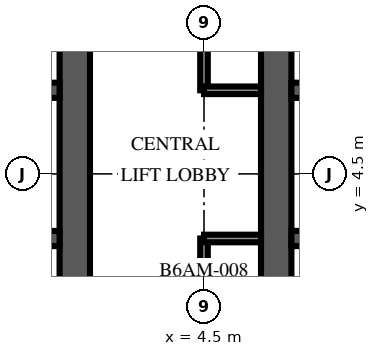
"""IFC4 building model, lengths in metres.
Left out: names, types, materials, properties, quantities, classifications, styles, units other than length and angle.
Written with IfcOpenShell. Run it as: python <this file> out.ifc"""

import sys

from ifc_helpers import new_model, si_unit, direction, frame, frame_2d, origin, place, context, subcontext, project, spatial, rectangle, extrude, element, fill, save


model = new_model("IFC4")
c1 = context("Model", 3, precision=1e-05, world=origin(), true_north=direction((0.0, 1.0)))
c2 = subcontext(c1, "Body", "Model", "MODEL_VIEW")
j1 = project(units=[si_unit("LENGTHUNIT", "METRE"), si_unit("PLANEANGLEUNIT", "RADIAN")], contexts=[c1])
p1 = place(None, origin())
s1 = spatial("IfcSite", under=j1, at=p1, CompositionType="ELEMENT")
p2 = place(p1, origin())
s2 = spatial("IfcBuilding", under=s1, at=p2, CompositionType="ELEMENT")
p3 = place(p2, frame((0.0, 0.0, 220.2)))
s3 = spatial("IfcBuildingStorey", under=s2, at=p3, CompositionType="ELEMENT", Elevation=220.2)
p4 = place(p3, frame((1.1, -9.0, 0.0), z_axis=(0.0, 0.0, 1.0), x_axis=(0.0, 1.0, 0.0)))
e1 = element("IfcWall", 1, at=p4, inside=s3, PredefinedType="SHEAR", context=c2, shape_type="SweptSolid", body=[
    extrude(rectangle(XDim=27.5, YDim=0.8, at=frame_2d((13.75, 0.0))), origin(), (0.0, 0.0, 1.0), 6.0),
])
p5 = place(p4, frame((12.55, 0.0, 0.0)))
e2 = element("IfcOpeningElement", 2, at=p5, cuts=e1, PredefinedType="OPENING", context=c2, shape_type="SweptSolid", body=[
    extrude(rectangle(XDim=2.4, YDim=2.4, at=frame_2d((1.2, 1.2))), frame((0.0, 0.41, 0.0), z_axis=(0.0, -1.0, 0.0), x_axis=(1.0, 0.0, 0.0)), (0.0, 0.0, 1.0), 0.82),
])
p6 = place(p4, frame((5.5, 0.0, 0.0)))
e3 = element("IfcOpeningElement", 3, at=p6, cuts=e1, PredefinedType="OPENING", context=c2, shape_type="SweptSolid", body=[
    extrude(rectangle(XDim=0.95, YDim=2.1, at=frame_2d((0.475, 1.05))), frame((0.0, 0.41, 0.0), z_axis=(0.0, -1.0, 0.0), x_axis=(1.0, 0.0, 0.0)), (0.0, 0.0, 1.0), 0.82),
])
p7 = place(p4, frame((23.475, 0.0, 0.0)))
e4 = element("IfcOpeningElement", 4, at=p7, cuts=e1, PredefinedType="OPENING", context=c2, shape_type="SweptSolid", body=[
    extrude(rectangle(XDim=1.2, YDim=2.1, at=frame_2d((0.6, 1.05))), frame((0.0, 0.41, 0.0), z_axis=(0.0, -1.0, 0.0), x_axis=(1.0, 0.0, 0.0)), (0.0, 0.0, 1.0), 0.82),
])
p8 = place(p3, frame((-9.7, 2.8, 0.0), z_axis=(0.0, 0.0, 1.0), x_axis=(1.0, 0.0, 0.0)))
e5 = element("IfcWall", 5, at=p8, inside=s3, PredefinedType="SHEAR", context=c2, shape_type="SweptSolid", body=[
    extrude(rectangle(XDim=10.4, YDim=0.4, at=frame_2d((5.2, 0.0))), origin(), (0.0, 0.0, 1.0), 6.0),
])
p9 = place(p8, frame((0.738, 0.0, 0.0)))
e6 = element("IfcOpeningElement", 6, at=p9, cuts=e5, PredefinedType="OPENING", context=c2, shape_type="SweptSolid", body=[
    extrude(rectangle(XDim=1.1, YDim=2.1, at=frame_2d((0.55, 1.05))), frame((0.0, 0.21, 0.0), z_axis=(0.0, -1.0, 0.0), x_axis=(1.0, 0.0, 0.0)), (0.0, 0.0, 1.0), 0.42),
])
p10 = place(p8, frame((3.337, 0.0, 0.0)))
e7 = element("IfcOpeningElement", 7, at=p10, cuts=e5, PredefinedType="OPENING", context=c2, shape_type="SweptSolid", body=[
    extrude(rectangle(XDim=1.1, YDim=2.1, at=frame_2d((0.55, 1.05))), frame((0.0, 0.21, 0.0), z_axis=(0.0, -1.0, 0.0), x_axis=(1.0, 0.0, 0.0)), (0.0, 0.0, 1.0), 0.42),
])
p11 = place(p8, frame((6.012, 0.0, 0.0)))
e8 = element("IfcOpeningElement", 8, at=p11, cuts=e5, PredefinedType="OPENING", context=c2, shape_type="SweptSolid", body=[
    extrude(rectangle(XDim=1.0, YDim=2.1, at=frame_2d((0.5, 1.05))), frame((0.0, 0.21, 0.0), z_axis=(0.0, -1.0, 0.0), x_axis=(1.0, 0.0, 0.0)), (0.0, 0.0, 1.0), 0.42),
])
p12 = place(p8, frame((8.613, 0.0, 0.0)))
e9 = element("IfcOpeningElement", 9, at=p12, cuts=e5, PredefinedType="OPENING", context=c2, shape_type="SweptSolid", body=[
    extrude(rectangle(XDim=1.0, YDim=2.1, at=frame_2d((0.5, 1.05))), frame((0.0, 0.21, 0.0), z_axis=(0.0, -1.0, 0.0), x_axis=(1.0, 0.0, 0.0)), (0.0, 0.0, 1.0), 0.42),
])
p13 = place(p3, frame((-9.7, 6.7, 0.0), z_axis=(0.0, 0.0, 1.0), x_axis=(1.0, 0.0, 0.0)))
e10 = element("IfcWall", 10, at=p13, inside=s3, PredefinedType="SHEAR", context=c2, shape_type="SweptSolid", body=[
    extrude(rectangle(XDim=10.4, YDim=0.4, at=frame_2d((5.2, 0.0))), origin(), (0.0, 0.0, 1.0), 6.0),
])
p14 = place(p13, frame((3.337, 0.0, 0.0)))
e11 = element("IfcOpeningElement", 11, at=p14, cuts=e10, PredefinedType="OPENING", context=c2, shape_type="SweptSolid", body=[
    extrude(rectangle(XDim=1.1, YDim=2.1, at=frame_2d((0.55, 1.05))), frame((0.0, 0.21, 0.0), z_axis=(0.0, -1.0, 0.0), x_axis=(1.0, 0.0, 0.0)), (0.0, 0.0, 1.0), 0.42),
])
p15 = place(p13, frame((5.962, 0.0, 0.0)))
e12 = element("IfcOpeningElement", 12, at=p15, cuts=e10, PredefinedType="OPENING", context=c2, shape_type="SweptSolid", body=[
    extrude(rectangle(XDim=1.1, YDim=2.1, at=frame_2d((0.55, 1.05))), frame((0.0, 0.21, 0.0), z_axis=(0.0, -1.0, 0.0), x_axis=(1.0, 0.0, 0.0)), (0.0, 0.0, 1.0), 0.42),
])
p16 = place(p13, frame((8.663, 0.0, 0.0)))
e13 = element("IfcOpeningElement", 13, at=p16, cuts=e10, PredefinedType="OPENING", context=c2, shape_type="SweptSolid", body=[
    extrude(rectangle(XDim=1.1, YDim=2.1, at=frame_2d((0.55, 1.05))), frame((0.0, 0.21, 0.0), z_axis=(0.0, -1.0, 0.0), x_axis=(1.0, 0.0, 0.0)), (0.0, 0.0, 1.0), 0.42),
])
p17 = place(p13, frame((0.688, 0.0, 0.0)))
e14 = element("IfcOpeningElement", 14, at=p17, cuts=e10, PredefinedType="OPENING", context=c2, shape_type="SweptSolid", body=[
    extrude(rectangle(XDim=1.0, YDim=2.1, at=frame_2d((0.5, 1.05))), frame((0.0, 0.21, 0.0), z_axis=(0.0, -1.0, 0.0), x_axis=(1.0, 0.0, 0.0)), (0.0, 0.0, 1.0), 0.42),
])
p18 = place(p3, frame((6.4, -9.0, 0.0), z_axis=(0.0, 0.0, 1.0), x_axis=(0.0, 1.0, 0.0)))
e15 = element("IfcWall", 15, at=p18, inside=s3, PredefinedType="SHEAR", context=c2, shape_type="SweptSolid", body=[
    extrude(rectangle(XDim=27.5, YDim=0.8, at=frame_2d((13.75, 0.0))), origin(), (0.0, 0.0, 1.0), 6.0),
])
p19 = place(p18, frame((12.55, 0.0, 0.0)))
e16 = element("IfcOpeningElement", 16, at=p19, cuts=e15, PredefinedType="OPENING", context=c2, shape_type="SweptSolid", body=[
    extrude(rectangle(XDim=2.4, YDim=2.4, at=frame_2d((1.2, 1.2))), frame((0.0, 0.41, 0.0), z_axis=(0.0, -1.0, 0.0), x_axis=(1.0, 0.0, 0.0)), (0.0, 0.0, 1.0), 0.82),
])
p20 = place(p18, frame((5.5, 0.0, 0.0)))
e17 = element("IfcOpeningElement", 17, at=p20, cuts=e15, PredefinedType="OPENING", context=c2, shape_type="SweptSolid", body=[
    extrude(rectangle(XDim=0.95, YDim=2.1, at=frame_2d((0.475, 1.05))), frame((0.0, 0.41, 0.0), z_axis=(0.0, -1.0, 0.0), x_axis=(1.0, 0.0, 0.0)), (0.0, 0.0, 1.0), 0.82),
])
p21 = place(p18, frame((23.475, 0.0, 0.0)))
e18 = element("IfcOpeningElement", 18, at=p21, cuts=e15, PredefinedType="OPENING", context=c2, shape_type="SweptSolid", body=[
    extrude(rectangle(XDim=1.2, YDim=2.1, at=frame_2d((0.6, 1.05))), frame((0.0, 0.41, 0.0), z_axis=(0.0, -1.0, 0.0), x_axis=(1.0, 0.0, 0.0)), (0.0, 0.0, 1.0), 0.82),
])
p22 = place(p3, frame((6.8, 2.8, 0.0), z_axis=(0.0, 0.0, 1.0), x_axis=(1.0, 0.0, 0.0)))
e19 = element("IfcWall", 19, at=p22, inside=s3, PredefinedType="SHEAR", context=c2, shape_type="SweptSolid", body=[
    extrude(rectangle(XDim=10.4, YDim=0.4, at=frame_2d((5.2, 0.0))), origin(), (0.0, 0.0, 1.0), 6.0),
])
p23 = place(p22, frame((0.738, 0.0, 0.0)))
e20 = element("IfcOpeningElement", 20, at=p23, cuts=e19, PredefinedType="OPENING", context=c2, shape_type="SweptSolid", body=[
    extrude(rectangle(XDim=1.1, YDim=2.1, at=frame_2d((0.55, 1.05))), frame((0.0, 0.21, 0.0), z_axis=(0.0, -1.0, 0.0), x_axis=(1.0, 0.0, 0.0)), (0.0, 0.0, 1.0), 0.42),
])
p24 = place(p22, frame((3.337, 0.0, 0.0)))
e21 = element("IfcOpeningElement", 21, at=p24, cuts=e19, PredefinedType="OPENING", context=c2, shape_type="SweptSolid", body=[
    extrude(rectangle(XDim=1.1, YDim=2.1, at=frame_2d((0.55, 1.05))), frame((0.0, 0.21, 0.0), z_axis=(0.0, -1.0, 0.0), x_axis=(1.0, 0.0, 0.0)), (0.0, 0.0, 1.0), 0.42),
])
p25 = place(p22, frame((6.012, 0.0, 0.0)))
e22 = element("IfcOpeningElement", 22, at=p25, cuts=e19, PredefinedType="OPENING", context=c2, shape_type="SweptSolid", body=[
    extrude(rectangle(XDim=1.0, YDim=2.1, at=frame_2d((0.5, 1.05))), frame((0.0, 0.21, 0.0), z_axis=(0.0, -1.0, 0.0), x_axis=(1.0, 0.0, 0.0)), (0.0, 0.0, 1.0), 0.42),
])
p26 = place(p22, frame((8.613, 0.0, 0.0)))
e23 = element("IfcOpeningElement", 23, at=p26, cuts=e19, PredefinedType="OPENING", context=c2, shape_type="SweptSolid", body=[
    extrude(rectangle(XDim=1.0, YDim=2.1, at=frame_2d((0.5, 1.05))), frame((0.0, 0.21, 0.0), z_axis=(0.0, -1.0, 0.0), x_axis=(1.0, 0.0, 0.0)), (0.0, 0.0, 1.0), 0.42),
])
p27 = place(p3, frame((6.8, 6.7, 0.0), z_axis=(0.0, 0.0, 1.0), x_axis=(1.0, 0.0, 0.0)))
e24 = element("IfcWall", 24, at=p27, inside=s3, PredefinedType="SHEAR", context=c2, shape_type="SweptSolid", body=[
    extrude(rectangle(XDim=10.4, YDim=0.4, at=frame_2d((5.2, 0.0))), origin(), (0.0, 0.0, 1.0), 6.0),
])
p28 = place(p27, frame((3.337, 0.0, 0.0)))
e25 = element("IfcOpeningElement", 25, at=p28, cuts=e24, PredefinedType="OPENING", context=c2, shape_type="SweptSolid", body=[
    extrude(rectangle(XDim=1.1, YDim=2.1, at=frame_2d((0.55, 1.05))), frame((0.0, 0.21, 0.0), z_axis=(0.0, -1.0, 0.0), x_axis=(1.0, 0.0, 0.0)), (0.0, 0.0, 1.0), 0.42),
])
p29 = place(p27, frame((5.962, 0.0, 0.0)))
e26 = element("IfcOpeningElement", 26, at=p29, cuts=e24, PredefinedType="OPENING", context=c2, shape_type="SweptSolid", body=[
    extrude(rectangle(XDim=1.1, YDim=2.1, at=frame_2d((0.55, 1.05))), frame((0.0, 0.21, 0.0), z_axis=(0.0, -1.0, 0.0), x_axis=(1.0, 0.0, 0.0)), (0.0, 0.0, 1.0), 0.42),
])
p30 = place(p27, frame((8.663, 0.0, 0.0)))
e27 = element("IfcOpeningElement", 27, at=p30, cuts=e24, PredefinedType="OPENING", context=c2, shape_type="SweptSolid", body=[
    extrude(rectangle(XDim=1.1, YDim=2.1, at=frame_2d((0.55, 1.05))), frame((0.0, 0.21, 0.0), z_axis=(0.0, -1.0, 0.0), x_axis=(1.0, 0.0, 0.0)), (0.0, 0.0, 1.0), 0.42),
])
p31 = place(p27, frame((0.688, 0.0, 0.0)))
e28 = element("IfcOpeningElement", 28, at=p31, cuts=e24, PredefinedType="OPENING", context=c2, shape_type="SweptSolid", body=[
    extrude(rectangle(XDim=1.0, YDim=2.1, at=frame_2d((0.5, 1.05))), frame((0.0, 0.21, 0.0), z_axis=(0.0, -1.0, 0.0), x_axis=(1.0, 0.0, 0.0)), (0.0, 0.0, 1.0), 0.42),
])
p32 = place(p3, frame((4.5, 2.8, 0.0), z_axis=(0.0, 0.0, 1.0), x_axis=(0.0, -1.0, 0.0)))
e29 = element("IfcWall", 29, at=p32, inside=s3, PredefinedType="PARTITIONING", context=c2, shape_type="SweptSolid", body=[
    extrude(rectangle(XDim=4.8, YDim=0.2, at=frame_2d((2.4, 0.0))), origin(), (0.0, 0.0, 1.0), 5.4),
])
p33 = place(p32, frame((1.45, 0.0, 0.0)))
e30 = element("IfcOpeningElement", 30, at=p33, cuts=e29, PredefinedType="OPENING", context=c2, shape_type="SweptSolid", body=[
    extrude(rectangle(XDim=1.0, YDim=2.1, at=frame_2d((0.5, 1.05))), frame((0.0, 0.11, 0.0), z_axis=(0.0, -1.0, 0.0), x_axis=(1.0, 0.0, 0.0)), (0.0, 0.0, 1.0), 0.22),
])
p34 = place(p3, frame((4.5, 18.5, 0.0), z_axis=(0.0, 0.0, 1.0), x_axis=(0.0, -1.0, 0.0)))
e31 = element("IfcWall", 31, at=p34, inside=s3, PredefinedType="PARTITIONING", context=c2, shape_type="SweptSolid", body=[
    extrude(rectangle(XDim=11.8, YDim=0.2, at=frame_2d((5.9, 0.0))), origin(), (0.0, 0.0, 1.0), 5.4),
])
p35 = place(p34, frame((5.95, 0.0, 0.0)))
e32 = element("IfcOpeningElement", 32, at=p35, cuts=e31, PredefinedType="OPENING", context=c2, shape_type="SweptSolid", body=[
    extrude(rectangle(XDim=1.0, YDim=2.1, at=frame_2d((0.5, 1.05))), frame((0.0, 0.11, 0.0), z_axis=(0.0, -1.0, 0.0), x_axis=(1.0, 0.0, 0.0)), (0.0, 0.0, 1.0), 0.22),
])
for number, where, z_axis, x_axis in (
    (33, (4.5, 2.8, 0.0), (0.0, 0.0, 1.0), (1.0, 0.0, 0.0)),
    (34, (4.5, 6.7, 0.0), (0.0, 0.0, 1.0), (1.0, 0.0, 0.0)),
):
    element("IfcWall", number, at=place(p3, frame(where, z_axis=z_axis, x_axis=x_axis)), inside=s3, PredefinedType="PARTITIONING", context=c2, shape_type="SweptSolid", body=[
        extrude(rectangle(XDim=1.5, YDim=0.2, at=frame_2d((0.75, 0.0))), origin(), (0.0, 0.0, 1.0), 5.4),
    ])
p36 = place(p5, origin())
e35 = element("IfcDoor", 35, at=p36, inside=s3, OperationType="DOUBLE_DOOR_DOUBLE_SWING", PredefinedType="DOOR", context=c2, shape_type="SweptSolid", body=[
    extrude(rectangle(XDim=2.4, YDim=2.4, at=frame_2d((1.2, 1.2))), frame((0.0, 0.025, 0.0), z_axis=(0.0, -1.0, 0.0), x_axis=(1.0, 0.0, 0.0)), (0.0, 0.0, 1.0), 0.05),
])
fill(e2, e35)
p37 = place(p19, origin())
e36 = element("IfcDoor", 36, at=p37, inside=s3, OperationType="DOUBLE_DOOR_DOUBLE_SWING", PredefinedType="DOOR", context=c2, shape_type="SweptSolid", body=[
    extrude(rectangle(XDim=2.4, YDim=2.4, at=frame_2d((1.2, 1.2))), frame((0.0, 0.025, 0.0), z_axis=(0.0, -1.0, 0.0), x_axis=(1.0, 0.0, 0.0)), (0.0, 0.0, 1.0), 0.05),
])
fill(e16, e36)
save(model, sys.argv[1])
